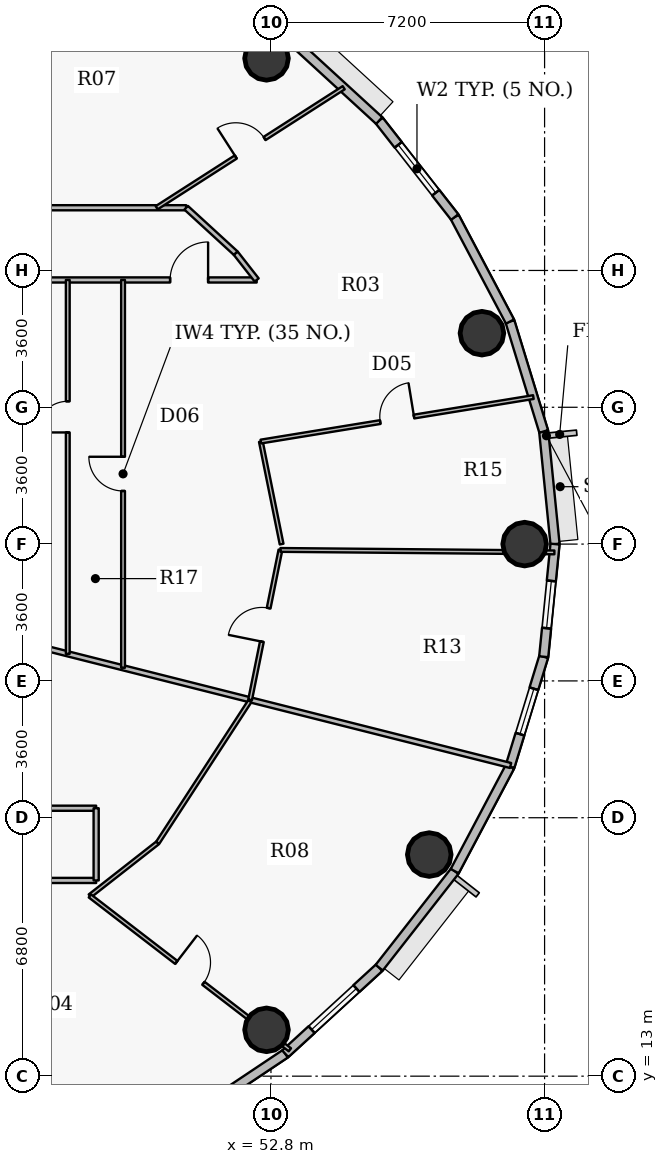
"""IFC4 building model, lengths in metres.
Left out: names, types, materials, properties, quantities, classifications, styles, units other than length and angle.
Written with IfcOpenShell. Run it as: python <this file> out.ifc"""

import sys

from ifc_helpers import new_model, si_unit, direction, frame, frame_2d, origin, origin_2d, place, context, subcontext, project, spatial, rectangle, hollow_circle, extrude, source, transform, mapped, element, fill, save


model = new_model("IFC4")
c1 = context("Model", 3, precision=1e-05, world=origin(), true_north=direction((0.0, 1.0)))
c2 = subcontext(c1, "Body", "Model", "MODEL_VIEW")
j1 = project(units=[si_unit("LENGTHUNIT", "METRE"), si_unit("PLANEANGLEUNIT", "RADIAN")], contexts=[c1])
p1 = place(None, origin())
s1 = spatial("IfcSite", under=j1, at=p1, CompositionType="ELEMENT")
p2 = place(p1, origin())
s2 = spatial("IfcBuilding", under=s1, at=p2, CompositionType="ELEMENT")
p3 = place(p2, frame((0.0, 0.0, 255.3)))
s3 = spatial("IfcBuildingStorey", under=s2, at=p3, CompositionType="ELEMENT", Elevation=255.3)
for number, where, z_axis, x_axis in (
    (1, (59.475, 27.0, 0.0), (0.0, 0.0, 1.0), (1.0, 0.0, 0.0)),
    (2, (58.351, 32.549, 0.0), (0.0, 0.0, 1.0), (1.0, 0.0, 0.0)),
    (3, (52.683, 39.781, 0.0), (0.0, 0.0, 1.0), (1.0, 0.0, 0.0)),
    (4, (52.683, 14.219, 0.0), (0.0, 0.0, 1.0), (1.0, 0.0, 0.0)),
    (5, (56.965, 18.831, 0.0), (0.0, 0.0, 1.0), (1.0, 0.0, 0.0)),
):
    element("IfcColumn", number, at=place(p3, frame(where, z_axis=z_axis, x_axis=x_axis)), inside=s3, PredefinedType="COLUMN", context=c2, shape_type="SweptSolid", body=[
        extrude(hollow_circle(Radius=0.575, WallThickness=0.036, at=origin_2d()), origin(), (0.0, 0.0, 1.0), 3.75),
    ])
p4 = place(p3, frame((59.977, 29.964, 0.0), z_axis=(0.0, 0.0, 1.0), x_axis=(0.099990595253, -0.994988382274, 0.0)))
e6 = element("IfcWall", 6, at=p4, inside=s3, PredefinedType="SOLIDWALL", context=c2, shape_type="SweptSolid", body=[
    extrude(rectangle(XDim=2.979, YDim=0.24, at=frame_2d((1.489, 0.0))), origin(), (0.0, 0.0, 1.0), 3.5),
])
p5 = place(p3, frame((59.09, 32.856, 0.0), z_axis=(0.0, 0.0, 1.0), x_axis=(0.293132907334, -0.95607170162, 0.0)))
e7 = element("IfcWall", 7, at=p5, inside=s3, PredefinedType="SOLIDWALL", context=c2, shape_type="SweptSolid", body=[
    extrude(rectangle(XDim=3.025, YDim=0.24, at=frame_2d((1.512, 0.0))), origin(), (0.0, 0.0, 1.0), 3.5),
])
p6 = place(p3, frame((57.636, 35.605, 0.0), z_axis=(0.0, 0.0, 1.0), x_axis=(0.46766049993, -0.883908172157, 0.0)))
e8 = element("IfcWall", 8, at=p6, inside=s3, PredefinedType="SOLIDWALL", context=c2, shape_type="SweptSolid", body=[
    extrude(rectangle(XDim=3.11, YDim=0.24, at=frame_2d((1.555, 0.0))), origin(), (0.0, 0.0, 1.0), 3.5),
])
p7 = place(p3, frame((55.648, 38.145, 0.0), z_axis=(0.0, 0.0, 1.0), x_axis=(0.616312344705, -0.787501805562, 0.0)))
e9 = element("IfcWall", 9, at=p7, inside=s3, PredefinedType="SOLIDWALL", context=c2, shape_type="SweptSolid", body=[
    extrude(rectangle(XDim=3.225, YDim=0.24, at=frame_2d((1.612, 0.0))), origin(), (0.0, 0.0, 1.0), 3.5),
])
p8 = place(p7, frame((0.812, 0.0, 0.9)))
e10 = element("IfcOpeningElement", 10, at=p8, cuts=e9, PredefinedType="OPENING", context=c2, shape_type="SweptSolid", body=[
    extrude(rectangle(XDim=1.6, YDim=1.75, at=origin_2d()), frame((0.8, 0.13, 0.875), z_axis=(0.0, -1.0, 0.0), x_axis=(1.0, 0.0, 0.0)), (0.0, 0.0, 1.0), 0.26),
])
p9 = place(p3, frame((53.176, 40.411, 0.0), z_axis=(0.0, 0.0, 1.0), x_axis=(0.737123922599, -0.675757591694, 0.0)))
e11 = element("IfcWall", 11, at=p9, inside=s3, PredefinedType="SOLIDWALL", context=c2, shape_type="SweptSolid", body=[
    extrude(rectangle(XDim=3.354, YDim=0.24, at=frame_2d((1.677, 0.0))), origin(), (0.0, 0.0, 1.0), 3.5),
])
p10 = place(p3, frame((53.176, 13.589, 0.0), z_axis=(0.0, 0.0, 1.0), x_axis=(-0.831262496074, -0.555880079352, 0.0)))
e12 = element("IfcWall", 12, at=p10, inside=s3, PredefinedType="SOLIDWALL", context=c2, shape_type="SweptSolid", body=[
    extrude(rectangle(XDim=3.484, YDim=0.24, at=frame_2d((1.742, 0.0))), origin(), (0.0, 0.0, 1.0), 3.5),
])
p11 = place(p3, frame((55.648, 15.855, 0.0), z_axis=(0.0, 0.0, 1.0), x_axis=(-0.737123922599, -0.675757591694, 0.0)))
e13 = element("IfcWall", 13, at=p11, inside=s3, PredefinedType="SOLIDWALL", context=c2, shape_type="SweptSolid", body=[
    extrude(rectangle(XDim=3.354, YDim=0.24, at=frame_2d((1.677, 0.0))), origin(), (0.0, 0.0, 1.0), 3.5),
])
p12 = place(p11, frame((0.813, 0.0, 0.9)))
e14 = element("IfcOpeningElement", 14, at=p12, cuts=e13, PredefinedType="OPENING", context=c2, shape_type="SweptSolid", body=[
    extrude(rectangle(XDim=1.6, YDim=1.75, at=origin_2d()), frame((0.8, 0.13, 0.875), z_axis=(0.0, -1.0, 0.0), x_axis=(1.0, 0.0, 0.0)), (0.0, 0.0, 1.0), 0.26),
])
p13 = place(p3, frame((57.636, 18.395, 0.0), z_axis=(0.0, 0.0, 1.0), x_axis=(-0.616312344705, -0.787501805562, 0.0)))
e15 = element("IfcWall", 15, at=p13, inside=s3, PredefinedType="SOLIDWALL", context=c2, shape_type="SweptSolid", body=[
    extrude(rectangle(XDim=3.225, YDim=0.24, at=frame_2d((1.612, 0.0))), origin(), (0.0, 0.0, 1.0), 3.5),
])
p14 = place(p3, frame((59.09, 21.144, 0.0), z_axis=(0.0, 0.0, 1.0), x_axis=(-0.46766049993, -0.883908172157, 0.0)))
e16 = element("IfcWall", 16, at=p14, inside=s3, PredefinedType="SOLIDWALL", context=c2, shape_type="SweptSolid", body=[
    extrude(rectangle(XDim=3.11, YDim=0.24, at=frame_2d((1.555, 0.0))), origin(), (0.0, 0.0, 1.0), 3.5),
])
p15 = place(p3, frame((59.977, 24.036, 0.0), z_axis=(0.0, 0.0, 1.0), x_axis=(-0.293132907334, -0.95607170162, 0.0)))
e17 = element("IfcWall", 17, at=p15, inside=s3, PredefinedType="SOLIDWALL", context=c2, shape_type="SweptSolid", body=[
    extrude(rectangle(XDim=3.025, YDim=0.24, at=frame_2d((1.512, 0.0))), origin(), (0.0, 0.0, 1.0), 3.5),
])
p16 = place(p15, frame((0.88, 0.0, 0.9)))
e18 = element("IfcOpeningElement", 18, at=p16, cuts=e17, PredefinedType="OPENING", context=c2, shape_type="SweptSolid", body=[
    extrude(rectangle(XDim=1.25, YDim=1.65, at=origin_2d()), frame((0.625, 0.13, 0.825), z_axis=(0.0, -1.0, 0.0), x_axis=(1.0, 0.0, 0.0)), (0.0, 0.0, 1.0), 0.26),
])
p17 = place(p3, frame((60.275, 27.0, 0.0), z_axis=(0.0, 0.0, 1.0), x_axis=(-0.099990595253, -0.994988382274, 0.0)))
e19 = element("IfcWall", 19, at=p17, inside=s3, PredefinedType="SOLIDWALL", context=c2, shape_type="SweptSolid", body=[
    extrude(rectangle(XDim=2.979, YDim=0.24, at=frame_2d((1.489, 0.0))), origin(), (0.0, 0.0, 1.0), 3.5),
])
p18 = place(p17, frame((0.974, 0.0, 0.9)))
e20 = element("IfcOpeningElement", 20, at=p18, cuts=e19, PredefinedType="OPENING", context=c2, shape_type="SweptSolid", body=[
    extrude(rectangle(XDim=1.25, YDim=1.65, at=origin_2d()), frame((0.625, 0.13, 0.825), z_axis=(0.0, -1.0, 0.0), x_axis=(1.0, 0.0, 0.0)), (0.0, 0.0, 1.0), 0.26),
])
p19 = place(p3, frame((24.35, 18.15, 0.0), z_axis=(0.0, 0.0, 1.0), x_axis=(1.0, 0.0, 0.0)))
e21 = element("IfcWall", 21, at=p19, inside=s3, PredefinedType="PARTITIONING", context=c2, shape_type="SweptSolid", body=[
    extrude(rectangle(XDim=23.85, YDim=0.135, at=frame_2d((11.925, 0.0))), origin(), (0.0, 0.0, 1.0), 2.935),
])
p20 = place(p19, frame((6.069, 0.0, 0.0)))
e22 = element("IfcOpeningElement", 22, at=p20, cuts=e21, PredefinedType="OPENING", context=c2, shape_type="SweptSolid", body=[
    extrude(rectangle(XDim=1.0, YDim=2.15, at=origin_2d()), frame((0.5, 0.078, 1.075), z_axis=(0.0, -1.0, 0.0), x_axis=(1.0, 0.0, 0.0)), (0.0, 0.0, 1.0), 0.155),
])
p21 = place(p19, frame((19.505, 0.0, 0.0)))
e23 = element("IfcOpeningElement", 23, at=p21, cuts=e21, PredefinedType="OPENING", context=c2, shape_type="SweptSolid", body=[
    extrude(rectangle(XDim=1.0, YDim=2.15, at=origin_2d()), frame((0.5, 0.078, 1.075), z_axis=(0.0, -1.0, 0.0), x_axis=(1.0, 0.0, 0.0)), (0.0, 0.0, 1.0), 0.155),
])
p22 = place(p3, frame((24.35, 35.85, 0.0), z_axis=(0.0, 0.0, 1.0), x_axis=(1.0, 0.0, 0.0)))
e24 = element("IfcWall", 24, at=p22, inside=s3, PredefinedType="PARTITIONING", context=c2, shape_type="SweptSolid", body=[
    extrude(rectangle(XDim=26.218, YDim=0.135, at=frame_2d((13.109, 0.0))), origin(), (0.0, 0.0, 1.0), 2.935),
])
p23 = place(p22, frame((8.045, 0.0, 0.0)))
e25 = element("IfcOpeningElement", 25, at=p23, cuts=e24, PredefinedType="OPENING", context=c2, shape_type="SweptSolid", body=[
    extrude(rectangle(XDim=1.0, YDim=2.15, at=origin_2d()), frame((0.5, 0.078, 1.075), z_axis=(0.0, -1.0, 0.0), x_axis=(1.0, 0.0, 0.0)), (0.0, 0.0, 1.0), 0.155),
])
p24 = place(p3, frame((41.946, 35.85, 0.0), z_axis=(0.0, 0.0, 1.0), x_axis=(0.557670345873, 0.830062518931, 0.0)))
e26 = element("IfcWall", 26, at=p24, inside=s3, PredefinedType="PARTITIONING", context=c2, shape_type="SweptSolid", body=[
    extrude(rectangle(XDim=9.568, YDim=0.135, at=frame_2d((4.784, 0.0))), origin(), (0.0, 0.0, 1.0), 2.935),
])
p25 = place(p3, frame((45.8, 20.05, 0.0), z_axis=(0.0, 0.0, 1.0), x_axis=(1.0, 0.0, 0.0)))
e27 = element("IfcWall", 27, at=p25, inside=s3, PredefinedType="PARTITIONING", context=c2, shape_type="SweptSolid", body=[
    extrude(rectangle(XDim=2.4, YDim=0.135, at=frame_2d((1.2, 0.0))), origin(), (0.0, 0.0, 1.0), 3.5),
])
p26 = place(p3, frame((45.8, 33.95, 0.0), z_axis=(0.0, 0.0, 1.0), x_axis=(1.0, 0.0, 0.0)))
e28 = element("IfcWall", 28, at=p26, inside=s3, PredefinedType="PARTITIONING", context=c2, shape_type="SweptSolid", body=[
    extrude(rectangle(XDim=6.624, YDim=0.135, at=frame_2d((3.312, 0.0))), origin(), (0.0, 0.0, 1.0), 3.5),
])
p27 = place(p26, frame((4.346, 0.0, 0.0)))
e29 = element("IfcOpeningElement", 29, at=p27, cuts=e28, PredefinedType="OPENING", context=c2, shape_type="SweptSolid", body=[
    extrude(rectangle(XDim=1.0, YDim=2.15, at=origin_2d()), frame((0.5, 0.078, 1.075), z_axis=(0.0, -1.0, 0.0), x_axis=(1.0, 0.0, 0.0)), (0.0, 0.0, 1.0), 0.155),
])
p28 = place(p3, frame((46.215, 24.425, 0.0), z_axis=(0.0, 0.0, 1.0), x_axis=(0.969657665326, -0.244466791355, 0.0)))
e30 = element("IfcWall", 30, at=p28, inside=s3, PredefinedType="PARTITIONING", context=c2, shape_type="SweptSolid", body=[
    extrude(rectangle(XDim=13.293, YDim=0.135, at=frame_2d((6.646, 0.0))), origin(), (0.0, 0.0, 1.0), 2.985),
])
p29 = place(p3, frame((47.453, 24.112, 0.0), z_axis=(0.0, 0.0, 1.0), x_axis=(0.0, 1.0, 0.0)))
e31 = element("IfcWall", 31, at=p29, inside=s3, PredefinedType="PARTITIONING", context=c2, shape_type="SweptSolid", body=[
    extrude(rectangle(XDim=9.838, YDim=0.1, at=frame_2d((4.919, 0.0))), origin(), (0.0, 0.0, 1.0), 2.935),
])
p30 = place(p29, frame((5.825, 0.0, 0.0)))
e32 = element("IfcOpeningElement", 32, at=p30, cuts=e31, PredefinedType="OPENING", context=c2, shape_type="SweptSolid", body=[
    extrude(rectangle(XDim=0.82, YDim=2.1, at=origin_2d()), frame((0.41, 0.06, 1.05), z_axis=(0.0, -1.0, 0.0), x_axis=(1.0, 0.0, 0.0)), (0.0, 0.0, 1.0), 0.12),
])
p31 = place(p3, frame((48.034, 17.743, 0.0), z_axis=(0.0, 0.0, 1.0), x_axis=(0.787427677995, 0.616407050517, 0.0)))
e33 = element("IfcWall", 33, at=p31, inside=s3, PredefinedType="PARTITIONING", context=c2, shape_type="SweptSolid", body=[
    extrude(rectangle(XDim=2.266, YDim=0.1, at=frame_2d((1.133, 0.0))), origin(), (0.0, 0.0, 1.0), 2.935),
])
p32 = place(p3, frame((48.034, 17.743, 0.0), z_axis=(0.0, 0.0, 1.0), x_axis=(0.792617155724, -0.609719644141, 0.0)))
e34 = element("IfcWall", 34, at=p32, inside=s3, PredefinedType="PARTITIONING", context=c2, shape_type="SweptSolid", body=[
    extrude(rectangle(XDim=6.641, YDim=0.1, at=frame_2d((3.32, 0.0))), origin(), (0.0, 0.0, 1.0), 2.935),
])
p33 = place(p32, frame((2.87, 0.0, 0.0)))
e35 = element("IfcOpeningElement", 35, at=p33, cuts=e34, PredefinedType="OPENING", context=c2, shape_type="SweptSolid", body=[
    extrude(rectangle(XDim=0.9, YDim=2.1, at=origin_2d()), frame((0.45, 0.06, 1.05), z_axis=(0.0, -1.0, 0.0), x_axis=(1.0, 0.0, 0.0)), (0.0, 0.0, 1.0), 0.12),
])
p34 = place(p3, frame((48.2, 18.15, 0.0), z_axis=(0.0, 0.0, 1.0), x_axis=(0.0, 1.0, 0.0)))
e36 = element("IfcWall", 36, at=p34, inside=s3, PredefinedType="PARTITIONING", context=c2, shape_type="SweptSolid", body=[
    extrude(rectangle(XDim=1.9, YDim=0.135, at=frame_2d((0.95, 0.0))), origin(), (0.0, 0.0, 1.0), 3.5),
])
p35 = place(p3, frame((48.908, 23.746, 0.0), z_axis=(0.0, 0.0, 1.0), x_axis=(0.0, 1.0, 0.0)))
e37 = element("IfcWall", 37, at=p35, inside=s3, PredefinedType="PARTITIONING", context=c2, shape_type="SweptSolid", body=[
    extrude(rectangle(XDim=10.204, YDim=0.1, at=frame_2d((5.102, 0.0))), origin(), (0.0, 0.0, 1.0), 2.935),
])
p36 = place(p35, frame((4.652, 0.0, 0.0)))
e38 = element("IfcOpeningElement", 38, at=p36, cuts=e37, PredefinedType="OPENING", context=c2, shape_type="SweptSolid", body=[
    extrude(rectangle(XDim=0.9, YDim=2.1, at=origin_2d()), frame((0.45, 0.06, 1.05), z_axis=(0.0, -1.0, 0.0), x_axis=(1.0, 0.0, 0.0)), (0.0, 0.0, 1.0), 0.12),
])
p37 = place(p3, frame((49.792, 35.85, 0.0), z_axis=(0.0, 0.0, 1.0), x_axis=(0.841640734873, 0.540037844416, 0.0)))
e39 = element("IfcWall", 39, at=p37, inside=s3, PredefinedType="PARTITIONING", context=c2, shape_type="SweptSolid", body=[
    extrude(rectangle(XDim=5.848, YDim=0.1, at=frame_2d((2.924, 0.0))), origin(), (0.0, 0.0, 1.0), 2.985),
])
p38 = place(p37, frame((2.474, 0.0, 0.0)))
e40 = element("IfcOpeningElement", 40, at=p38, cuts=e39, PredefinedType="OPENING", context=c2, shape_type="SweptSolid", body=[
    extrude(rectangle(XDim=0.9, YDim=2.1, at=origin_2d()), frame((0.45, 0.06, 1.05), z_axis=(0.0, -1.0, 0.0), x_axis=(1.0, 0.0, 0.0)), (0.0, 0.0, 1.0), 0.12),
])
p39 = place(p3, frame((49.818, 19.139, 0.0), z_axis=(0.0, 0.0, 1.0), x_axis=(0.545406924684, 0.83817139447, 0.0)))
e41 = element("IfcWall", 41, at=p39, inside=s3, PredefinedType="PARTITIONING", context=c2, shape_type="SweptSolid", body=[
    extrude(rectangle(XDim=4.448, YDim=0.1, at=frame_2d((2.224, 0.0))), origin(), (0.0, 0.0, 1.0), 2.935),
])
p40 = place(p3, frame((50.568, 35.85, 0.0), z_axis=(0.0, 0.0, 1.0), x_axis=(0.737102657331, -0.675780787353, 0.0)))
e42 = element("IfcWall", 42, at=p40, inside=s3, PredefinedType="PARTITIONING", context=c2, shape_type="SweptSolid", body=[
    extrude(rectangle(XDim=1.772, YDim=0.135, at=frame_2d((0.886, 0.0))), origin(), (0.0, 0.0, 1.0), 3.5),
])
p41 = place(p3, frame((51.874, 34.653, 0.0), z_axis=(0.0, 0.0, 1.0), x_axis=(0.61628613448, -0.787522317429, 0.0)))
e43 = element("IfcWall", 43, at=p41, inside=s3, PredefinedType="PARTITIONING", context=c2, shape_type="SweptSolid", body=[
    extrude(rectangle(XDim=0.893, YDim=0.135, at=frame_2d((0.446, 0.0))), origin(), (0.0, 0.0, 1.0), 3.5),
])
p42 = place(p3, frame((52.251, 22.903, 0.0), z_axis=(0.0, 0.0, 1.0), x_axis=(0.198227662963, 0.980156004744, 0.0)))
e44 = element("IfcWall", 44, at=p42, inside=s3, PredefinedType="PARTITIONING", context=c2, shape_type="SweptSolid", body=[
    extrude(rectangle(XDim=4.024, YDim=0.1, at=frame_2d((2.012, 0.0))), origin(), (0.0, 0.0, 1.0), 2.935),
])
p43 = place(p42, frame((1.562, 0.0, 0.0)))
e45 = element("IfcOpeningElement", 45, at=p43, cuts=e44, PredefinedType="OPENING", context=c2, shape_type="SweptSolid", body=[
    extrude(rectangle(XDim=0.9, YDim=2.1, at=origin_2d()), frame((0.45, 0.06, 1.05), z_axis=(0.0, -1.0, 0.0), x_axis=(1.0, 0.0, 0.0)), (0.0, 0.0, 1.0), 0.12),
])
p44 = place(p3, frame((52.534, 29.698, 0.0), z_axis=(0.0, 0.0, 1.0), x_axis=(0.198315891718, -0.980138157145, 0.0)))
e46 = element("IfcWall", 46, at=p44, inside=s3, PredefinedType="PARTITIONING", context=c2, shape_type="SweptSolid", body=[
    extrude(rectangle(XDim=2.753, YDim=0.1, at=frame_2d((1.376, 0.0))), origin(), (0.0, 0.0, 1.0), 2.935),
])
p45 = place(p3, frame((52.534, 29.698, 0.0), z_axis=(0.0, 0.0, 1.0), x_axis=(0.98694585474, 0.161052413243, 0.0)))
e47 = element("IfcWall", 47, at=p45, inside=s3, PredefinedType="PARTITIONING", context=c2, shape_type="SweptSolid", body=[
    extrude(rectangle(XDim=7.266, YDim=0.1, at=frame_2d((3.633, 0.0))), origin(), (0.0, 0.0, 1.0), 2.985),
])
p46 = place(p45, frame((3.183, 0.0, 0.0)))
e48 = element("IfcOpeningElement", 48, at=p46, cuts=e47, PredefinedType="OPENING", context=c2, shape_type="SweptSolid", body=[
    extrude(rectangle(XDim=0.9, YDim=2.1, at=origin_2d()), frame((0.45, 0.06, 1.05), z_axis=(0.0, -1.0, 0.0), x_axis=(1.0, 0.0, 0.0)), (0.0, 0.0, 1.0), 0.12),
])
p47 = place(p3, frame((53.049, 26.846, 0.0), z_axis=(0.0, 0.0, 1.0), x_axis=(0.999959429593, -0.009007728276, 0.0)))
e49 = element("IfcWall", 49, at=p47, inside=s3, PredefinedType="PARTITIONING", context=c2, shape_type="SweptSolid", body=[
    extrude(rectangle(XDim=7.209, YDim=0.1, at=frame_2d((3.605, 0.0))), origin(), (0.0, 0.0, 1.0), 2.935),
])
m1 = source(origin(), c2, "Body", "SweptSolid", [
    extrude(rectangle(XDim=1.6, YDim=1.75, at=origin_2d()), frame((0.8, 0.03, 0.875), z_axis=(0.0, -1.0, 0.0), x_axis=(1.0, 0.0, 0.0)), (0.0, 0.0, 1.0), 0.06),
])
p48 = place(p8, origin())
e50 = element("IfcWindow", 50, at=p48, inside=s3, PartitioningType="DOUBLE_PANEL_VERTICAL", PredefinedType="WINDOW", context=c2, shape_type="MappedRepresentation", body=[
    mapped(m1, transform((0.0, 0.0, 0.0), x_axis=(1.0, 0.0, 0.0), y_axis=(0.0, 1.0, 0.0), z_axis=(0.0, 0.0, 1.0), scale=1.0)),
])
fill(e10, e50)
p49 = place(p12, origin())
e51 = element("IfcWindow", 51, at=p49, inside=s3, PartitioningType="DOUBLE_PANEL_VERTICAL", PredefinedType="WINDOW", context=c2, shape_type="MappedRepresentation", body=[
    mapped(m1, transform((0.0, 0.0, 0.0), x_axis=(1.0, 0.0, 0.0), y_axis=(0.0, 1.0, 0.0), z_axis=(0.0, 0.0, 1.0), scale=1.0)),
])
fill(e14, e51)
m2 = source(origin(), c2, "Body", "SweptSolid", [
    extrude(rectangle(XDim=1.25, YDim=1.65, at=origin_2d()), frame((0.625, 0.03, 0.825), z_axis=(0.0, -1.0, 0.0), x_axis=(1.0, 0.0, 0.0)), (0.0, 0.0, 1.0), 0.06),
])
p50 = place(p16, origin())
e52 = element("IfcWindow", 52, at=p50, inside=s3, PartitioningType="SINGLE_PANEL", PredefinedType="WINDOW", context=c2, shape_type="MappedRepresentation", body=[
    mapped(m2, transform((0.0, 0.0, 0.0), x_axis=(1.0, 0.0, 0.0), y_axis=(0.0, 1.0, 0.0), z_axis=(0.0, 0.0, 1.0), scale=1.0)),
])
fill(e18, e52)
p51 = place(p18, origin())
e53 = element("IfcWindow", 53, at=p51, inside=s3, PartitioningType="SINGLE_PANEL", PredefinedType="WINDOW", context=c2, shape_type="MappedRepresentation", body=[
    mapped(m2, transform((0.0, 0.0, 0.0), x_axis=(1.0, 0.0, 0.0), y_axis=(0.0, 1.0, 0.0), z_axis=(0.0, 0.0, 1.0), scale=1.0)),
])
fill(e20, e53)
m3 = source(origin(), c2, "Body", "SweptSolid", [
    extrude(rectangle(XDim=0.9, YDim=2.1, at=origin_2d()), frame((0.45, 0.025, 1.05), z_axis=(0.0, -1.0, 0.0), x_axis=(1.0, 0.0, 0.0)), (0.0, 0.0, 1.0), 0.05),
])
p52 = place(p33, origin())
e54 = element("IfcDoor", 54, at=p52, inside=s3, OperationType="SINGLE_SWING_LEFT", PredefinedType="DOOR", context=c2, shape_type="MappedRepresentation", body=[
    mapped(m3, transform((0.0, 0.0, 0.0), x_axis=(1.0, 0.0, 0.0), y_axis=(0.0, 1.0, 0.0), z_axis=(0.0, 0.0, 1.0), scale=1.0)),
])
fill(e35, e54)
m4 = source(origin(), c2, "Body", "SweptSolid", [
    extrude(rectangle(XDim=1.0, YDim=2.15, at=origin_2d()), frame((0.5, 0.025, 1.075), z_axis=(0.0, -1.0, 0.0), x_axis=(1.0, 0.0, 0.0)), (0.0, 0.0, 1.0), 0.05),
])
p53 = place(p27, origin())
e55 = element("IfcDoor", 55, at=p53, inside=s3, OperationType="SINGLE_SWING_RIGHT", PredefinedType="DOOR", context=c2, shape_type="MappedRepresentation", body=[
    mapped(m4, transform((0.0, 0.0, 0.0), x_axis=(1.0, 0.0, 0.0), y_axis=(0.0, 1.0, 0.0), z_axis=(0.0, 0.0, 1.0), scale=1.0)),
])
fill(e29, e55)
p54 = place(p43, origin())
e56 = element("IfcDoor", 56, at=p54, inside=s3, OperationType="SINGLE_SWING_LEFT", PredefinedType="DOOR", context=c2, shape_type="MappedRepresentation", body=[
    mapped(m3, transform((0.0, 0.0, 0.0), x_axis=(1.0, 0.0, 0.0), y_axis=(0.0, 1.0, 0.0), z_axis=(0.0, 0.0, 1.0), scale=1.0)),
])
fill(e45, e56)
p55 = place(p46, origin())
e57 = element("IfcDoor", 57, at=p55, inside=s3, OperationType="SINGLE_SWING_RIGHT", PredefinedType="DOOR", context=c2, shape_type="MappedRepresentation", body=[
    mapped(m3, transform((0.0, 0.0, 0.0), x_axis=(1.0, 0.0, 0.0), y_axis=(0.0, 1.0, 0.0), z_axis=(0.0, 0.0, 1.0), scale=1.0)),
])
fill(e48, e57)
p56 = place(p38, origin())
e58 = element("IfcDoor", 58, at=p56, inside=s3, OperationType="SINGLE_SWING_LEFT", PredefinedType="DOOR", context=c2, shape_type="MappedRepresentation", body=[
    mapped(m3, transform((0.0, 0.0, 0.0), x_axis=(1.0, 0.0, 0.0), y_axis=(0.0, 1.0, 0.0), z_axis=(0.0, 0.0, 1.0), scale=1.0)),
])
fill(e40, e58)
p57 = place(p36, origin())
e59 = element("IfcDoor", 59, at=p57, inside=s3, OperationType="SINGLE_SWING_RIGHT", PredefinedType="DOOR", context=c2, shape_type="MappedRepresentation", body=[
    mapped(m3, transform((0.0, 0.0, 0.0), x_axis=(1.0, 0.0, 0.0), y_axis=(0.0, 1.0, 0.0), z_axis=(0.0, 0.0, 1.0), scale=1.0)),
])
fill(e38, e59)
m5 = source(origin(), c2, "Body", "SweptSolid", [
    extrude(rectangle(XDim=0.82, YDim=2.1, at=origin_2d()), frame((0.41, 0.025, 1.05), z_axis=(0.0, -1.0, 0.0), x_axis=(1.0, 0.0, 0.0)), (0.0, 0.0, 1.0), 0.05),
])
p58 = place(p30, origin())
e60 = element("IfcDoor", 60, at=p58, inside=s3, OperationType="SINGLE_SWING_LEFT", PredefinedType="DOOR", context=c2, shape_type="MappedRepresentation", body=[
    mapped(m5, transform((0.0, 0.0, 0.0), x_axis=(1.0, 0.0, 0.0), y_axis=(0.0, 1.0, 0.0), z_axis=(0.0, 0.0, 1.0), scale=1.0)),
])
fill(e32, e60)
save(model, sys.argv[1])
